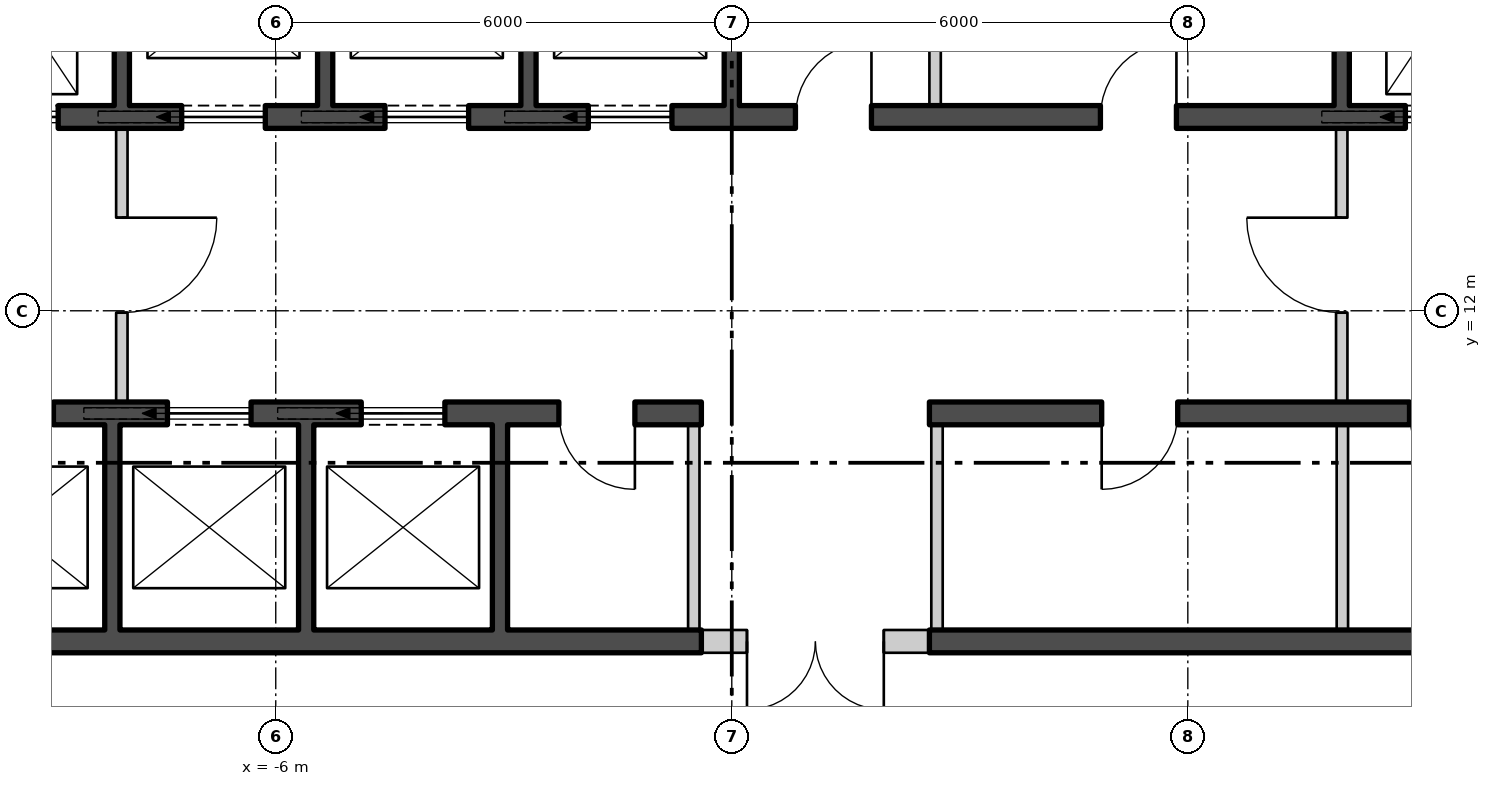
"""IFC4 building model, lengths in metres.
Left out: names, types, materials, properties, quantities, classifications, styles, units other than length and angle.
Written with IfcOpenShell. Run it as: python <this file> out.ifc"""

import sys

from ifc_helpers import new_model, si_unit, direction, frame, frame_2d, origin, place, context, subcontext, project, spatial, polyline, rectangle, outline, extrude, element, fill, save


model = new_model("IFC4")
c1 = context("Model", 3, precision=1e-05, world=origin(), true_north=direction((0.0, 1.0)))
c2 = subcontext(c1, "Body", "Model", "MODEL_VIEW")
j1 = project(units=[si_unit("LENGTHUNIT", "METRE"), si_unit("PLANEANGLEUNIT", "RADIAN")], contexts=[c1])
p1 = place(None, origin())
s1 = spatial("IfcSite", under=j1, at=p1, CompositionType="ELEMENT")
p2 = place(p1, origin())
s2 = spatial("IfcBuilding", under=s1, at=p2, CompositionType="ELEMENT")
p3 = place(p2, frame((0.0, 0.0, 292.2)))
s3 = spatial("IfcBuildingStorey", under=s2, at=p3, CompositionType="ELEMENT", Elevation=292.2)
p4 = place(p3, frame((-25.28, 15.792, -0.18), z_axis=(0.0, 0.0, 1.0), x_axis=(0.500000141277, -0.866025322218, 0.0)))
e1 = element("IfcWall", 1, at=p4, inside=s3, PredefinedType="SOLIDWALL", context=c2, shape_type="SweptSolid", body=[
    extrude(outline(polyline([(-0.13, -0.225), (45.86, -0.225), (45.6, 0.225), (0.13, 0.225), (-0.13, -0.225)])), origin(), (0.0, 0.0, 1.0), 5.9),
])
p5 = place(p4, frame((1.424, 0.0, 1.38)))
e2 = element("IfcOpeningElement", 2, at=p5, cuts=e1, PredefinedType="OPENING", context=c2, shape_type="SweptSolid", body=[
    extrude(rectangle(XDim=2.4, YDim=3.6, at=frame_2d((1.2, 1.8))), frame((0.0, 0.235, 0.0), z_axis=(0.0, -1.0, 0.0), x_axis=(1.0, 0.0, 0.0)), (0.0, 0.0, 1.0), 0.47),
])
p6 = place(p4, frame((5.892, 0.0, 1.38)))
e3 = element("IfcOpeningElement", 3, at=p6, cuts=e1, PredefinedType="OPENING", context=c2, shape_type="SweptSolid", body=[
    extrude(rectangle(XDim=2.4, YDim=3.6, at=frame_2d((1.2, 1.8))), frame((0.0, 0.235, 0.0), z_axis=(0.0, -1.0, 0.0), x_axis=(1.0, 0.0, 0.0)), (0.0, 0.0, 1.0), 0.47),
])
p7 = place(p4, frame((10.399, 0.0, 1.38)))
e4 = element("IfcOpeningElement", 4, at=p7, cuts=e1, PredefinedType="OPENING", context=c2, shape_type="SweptSolid", body=[
    extrude(rectangle(XDim=2.4, YDim=3.6, at=frame_2d((1.2, 1.8))), frame((0.0, 0.235, 0.0), z_axis=(0.0, -1.0, 0.0), x_axis=(1.0, 0.0, 0.0)), (0.0, 0.0, 1.0), 0.47),
])
p8 = place(p4, frame((14.905, 0.0, 1.38)))
e5 = element("IfcOpeningElement", 5, at=p8, cuts=e1, PredefinedType="OPENING", context=c2, shape_type="SweptSolid", body=[
    extrude(rectangle(XDim=2.4, YDim=3.6, at=frame_2d((1.2, 1.8))), frame((0.0, 0.235, 0.0), z_axis=(0.0, -1.0, 0.0), x_axis=(1.0, 0.0, 0.0)), (0.0, 0.0, 1.0), 0.47),
])
p9 = place(p4, frame((19.412, 0.0, 1.38)))
e6 = element("IfcOpeningElement", 6, at=p9, cuts=e1, PredefinedType="OPENING", context=c2, shape_type="SweptSolid", body=[
    extrude(rectangle(XDim=2.4, YDim=3.6, at=frame_2d((1.2, 1.8))), frame((0.0, 0.235, 0.0), z_axis=(0.0, -1.0, 0.0), x_axis=(1.0, 0.0, 0.0)), (0.0, 0.0, 1.0), 0.47),
])
p10 = place(p4, frame((23.918, 0.0, 1.38)))
e7 = element("IfcOpeningElement", 7, at=p10, cuts=e1, PredefinedType="OPENING", context=c2, shape_type="SweptSolid", body=[
    extrude(rectangle(XDim=2.4, YDim=3.6, at=frame_2d((1.2, 1.8))), frame((0.0, 0.235, 0.0), z_axis=(0.0, -1.0, 0.0), x_axis=(1.0, 0.0, 0.0)), (0.0, 0.0, 1.0), 0.47),
])
p11 = place(p4, frame((28.425, 0.0, 1.38)))
e8 = element("IfcOpeningElement", 8, at=p11, cuts=e1, PredefinedType="OPENING", context=c2, shape_type="SweptSolid", body=[
    extrude(rectangle(XDim=2.4, YDim=3.6, at=frame_2d((1.2, 1.8))), frame((0.0, 0.235, 0.0), z_axis=(0.0, -1.0, 0.0), x_axis=(1.0, 0.0, 0.0)), (0.0, 0.0, 1.0), 0.47),
])
p12 = place(p4, frame((32.932, 0.0, 1.38)))
e9 = element("IfcOpeningElement", 9, at=p12, cuts=e1, PredefinedType="OPENING", context=c2, shape_type="SweptSolid", body=[
    extrude(rectangle(XDim=2.4, YDim=3.6, at=frame_2d((1.2, 1.8))), frame((0.0, 0.235, 0.0), z_axis=(0.0, -1.0, 0.0), x_axis=(1.0, 0.0, 0.0)), (0.0, 0.0, 1.0), 0.47),
])
p13 = place(p4, frame((37.438, 0.0, 1.38)))
e10 = element("IfcOpeningElement", 10, at=p13, cuts=e1, PredefinedType="OPENING", context=c2, shape_type="SweptSolid", body=[
    extrude(rectangle(XDim=2.4, YDim=3.6, at=frame_2d((1.2, 1.8))), frame((0.0, 0.235, 0.0), z_axis=(0.0, -1.0, 0.0), x_axis=(1.0, 0.0, 0.0)), (0.0, 0.0, 1.0), 0.47),
])
p14 = place(p4, frame((41.907, 0.0, 1.38)))
e11 = element("IfcOpeningElement", 11, at=p14, cuts=e1, PredefinedType="OPENING", context=c2, shape_type="SweptSolid", body=[
    extrude(rectangle(XDim=2.4, YDim=3.6, at=frame_2d((1.2, 1.8))), frame((0.0, 0.235, 0.0), z_axis=(0.0, -1.0, 0.0), x_axis=(1.0, 0.0, 0.0)), (0.0, 0.0, 1.0), 0.47),
])
p15 = place(p3, frame((-10.7, 14.55, 0.0), z_axis=(0.0, 0.0, 1.0), x_axis=(1.0, 0.0, 0.0)))
e12 = element("IfcWall", 12, at=p15, inside=s3, PredefinedType="SHEAR", context=c2, shape_type="SweptSolid", body=[
    extrude(rectangle(XDim=21.4, YDim=0.3, at=frame_2d((10.7, 0.0))), origin(), (0.0, 0.0, 1.0), 5.7),
])
p16 = place(p15, frame((0.738, 0.0, 0.0)))
e13 = element("IfcOpeningElement", 13, at=p16, cuts=e12, PredefinedType="OPENING", context=c2, shape_type="SweptSolid", body=[
    extrude(rectangle(XDim=1.1, YDim=2.1, at=frame_2d((0.55, 1.05))), frame((0.0, 0.16, 0.0), z_axis=(0.0, -1.0, 0.0), x_axis=(1.0, 0.0, 0.0)), (0.0, 0.0, 1.0), 0.32),
])
p17 = place(p15, frame((3.462, 0.0, 0.0)))
e14 = element("IfcOpeningElement", 14, at=p17, cuts=e12, PredefinedType="OPENING", context=c2, shape_type="SweptSolid", body=[
    extrude(rectangle(XDim=1.1, YDim=2.1, at=frame_2d((0.55, 1.05))), frame((0.0, 0.16, 0.0), z_axis=(0.0, -1.0, 0.0), x_axis=(1.0, 0.0, 0.0)), (0.0, 0.0, 1.0), 0.32),
])
p18 = place(p15, frame((6.138, 0.0, 0.0)))
e15 = element("IfcOpeningElement", 15, at=p18, cuts=e12, PredefinedType="OPENING", context=c2, shape_type="SweptSolid", body=[
    extrude(rectangle(XDim=1.1, YDim=2.1, at=frame_2d((0.55, 1.05))), frame((0.0, 0.16, 0.0), z_axis=(0.0, -1.0, 0.0), x_axis=(1.0, 0.0, 0.0)), (0.0, 0.0, 1.0), 0.32),
])
p19 = place(p15, frame((8.812, 0.0, 0.0)))
e16 = element("IfcOpeningElement", 16, at=p19, cuts=e12, PredefinedType="OPENING", context=c2, shape_type="SweptSolid", body=[
    extrude(rectangle(XDim=1.1, YDim=2.1, at=frame_2d((0.55, 1.05))), frame((0.0, 0.16, 0.0), z_axis=(0.0, -1.0, 0.0), x_axis=(1.0, 0.0, 0.0)), (0.0, 0.0, 1.0), 0.32),
])
p20 = place(p15, frame((19.562, 0.0, 0.0)))
e17 = element("IfcOpeningElement", 17, at=p20, cuts=e12, PredefinedType="OPENING", context=c2, shape_type="SweptSolid", body=[
    extrude(rectangle(XDim=1.1, YDim=2.1, at=frame_2d((0.55, 1.05))), frame((0.0, 0.16, 0.0), z_axis=(0.0, -1.0, 0.0), x_axis=(1.0, 0.0, 0.0)), (0.0, 0.0, 1.0), 0.32),
])
p21 = place(p15, frame((11.537, 0.0, 0.0)))
e18 = element("IfcOpeningElement", 18, at=p21, cuts=e12, PredefinedType="OPENING", context=c2, shape_type="SweptSolid", body=[
    extrude(rectangle(XDim=1.0, YDim=2.1, at=frame_2d((0.5, 1.05))), frame((0.0, 0.16, 0.0), z_axis=(0.0, -1.0, 0.0), x_axis=(1.0, 0.0, 0.0)), (0.0, 0.0, 1.0), 0.32),
])
p22 = place(p15, frame((15.55, 0.0, 0.0)))
e19 = element("IfcOpeningElement", 19, at=p22, cuts=e12, PredefinedType="OPENING", context=c2, shape_type="SweptSolid", body=[
    extrude(rectangle(XDim=1.0, YDim=2.1, at=frame_2d((0.5, 1.05))), frame((0.0, 0.16, 0.0), z_axis=(0.0, -1.0, 0.0), x_axis=(1.0, 0.0, 0.0)), (0.0, 0.0, 1.0), 0.32),
])
p23 = place(p3, frame((-10.7, 10.65, 0.0), z_axis=(0.0, 0.0, 1.0), x_axis=(1.0, 0.0, 0.0)))
e20 = element("IfcWall", 20, at=p23, inside=s3, PredefinedType="SHEAR", context=c2, shape_type="SweptSolid", body=[
    extrude(rectangle(XDim=10.3, YDim=0.3, at=frame_2d((5.15, 0.0))), origin(), (0.0, 0.0, 1.0), 5.7),
])
p24 = place(p23, frame((0.675, 0.0, 0.0)))
e21 = element("IfcOpeningElement", 21, at=p24, cuts=e20, PredefinedType="OPENING", context=c2, shape_type="SweptSolid", body=[
    extrude(rectangle(XDim=1.1, YDim=2.1, at=frame_2d((0.55, 1.05))), frame((0.0, 0.16, 0.0), z_axis=(0.0, -1.0, 0.0), x_axis=(1.0, 0.0, 0.0)), (0.0, 0.0, 1.0), 0.32),
])
p25 = place(p23, frame((3.275, 0.0, 0.0)))
e22 = element("IfcOpeningElement", 22, at=p25, cuts=e20, PredefinedType="OPENING", context=c2, shape_type="SweptSolid", body=[
    extrude(rectangle(XDim=1.1, YDim=2.1, at=frame_2d((0.55, 1.05))), frame((0.0, 0.16, 0.0), z_axis=(0.0, -1.0, 0.0), x_axis=(1.0, 0.0, 0.0)), (0.0, 0.0, 1.0), 0.32),
])
p26 = place(p23, frame((5.825, 0.0, 0.0)))
e23 = element("IfcOpeningElement", 23, at=p26, cuts=e20, PredefinedType="OPENING", context=c2, shape_type="SweptSolid", body=[
    extrude(rectangle(XDim=1.1, YDim=2.1, at=frame_2d((0.55, 1.05))), frame((0.0, 0.16, 0.0), z_axis=(0.0, -1.0, 0.0), x_axis=(1.0, 0.0, 0.0)), (0.0, 0.0, 1.0), 0.32),
])
p27 = place(p23, frame((8.425, 0.0, 0.0)))
e24 = element("IfcOpeningElement", 24, at=p27, cuts=e20, PredefinedType="OPENING", context=c2, shape_type="SweptSolid", body=[
    extrude(rectangle(XDim=1.0, YDim=2.1, at=frame_2d((0.5, 1.05))), frame((0.0, 0.16, 0.0), z_axis=(0.0, -1.0, 0.0), x_axis=(1.0, 0.0, 0.0)), (0.0, 0.0, 1.0), 0.32),
])
p28 = place(p3, frame((-10.7, 7.65, 0.0), z_axis=(0.0, 0.0, 1.0), x_axis=(1.0, 0.0, 0.0)))
e25 = element("IfcWall", 25, at=p28, inside=s3, PredefinedType="SHEAR", context=c2, shape_type="SweptSolid", body=[
    extrude(rectangle(XDim=10.3, YDim=0.3, at=frame_2d((5.15, 0.0))), origin(), (0.0, 0.0, 1.0), 5.7),
])
p29 = place(p3, frame((2.6, 10.65, 0.0), z_axis=(0.0, 0.0, 1.0), x_axis=(1.0, 0.0, 0.0)))
e26 = element("IfcWall", 26, at=p29, inside=s3, PredefinedType="SHEAR", context=c2, shape_type="SweptSolid", body=[
    extrude(rectangle(XDim=8.1, YDim=0.3, at=frame_2d((4.05, 0.0))), origin(), (0.0, 0.0, 1.0), 5.7),
])
p30 = place(p29, frame((2.267, 0.0, 0.0)))
e27 = element("IfcOpeningElement", 27, at=p30, cuts=e26, PredefinedType="OPENING", context=c2, shape_type="SweptSolid", body=[
    extrude(rectangle(XDim=1.0, YDim=2.1, at=frame_2d((0.5, 1.05))), frame((0.0, 0.16, 0.0), z_axis=(0.0, -1.0, 0.0), x_axis=(1.0, 0.0, 0.0)), (0.0, 0.0, 1.0), 0.32),
])
p31 = place(p29, frame((6.317, 0.0, 0.0)))
e28 = element("IfcOpeningElement", 28, at=p31, cuts=e26, PredefinedType="OPENING", context=c2, shape_type="SweptSolid", body=[
    extrude(rectangle(XDim=1.0, YDim=2.1, at=frame_2d((0.5, 1.05))), frame((0.0, 0.16, 0.0), z_axis=(0.0, -1.0, 0.0), x_axis=(1.0, 0.0, 0.0)), (0.0, 0.0, 1.0), 0.32),
])
p32 = place(p3, frame((2.6, 7.65, 0.0), z_axis=(0.0, 0.0, 1.0), x_axis=(1.0, 0.0, 0.0)))
e29 = element("IfcWall", 29, at=p32, inside=s3, PredefinedType="SHEAR", context=c2, shape_type="SweptSolid", body=[
    extrude(rectangle(XDim=8.1, YDim=0.3, at=frame_2d((4.05, 0.0))), origin(), (0.0, 0.0, 1.0), 5.7),
])
for number, where, z_axis, x_axis in (
    (30, (-8.025, 14.7, 0.0), (0.0, 0.0, 1.0), (0.0, 1.0, 0.0)),
    (31, (-5.35, 14.7, 0.0), (0.0, 0.0, 1.0), (0.0, 1.0, 0.0)),
    (32, (-2.675, 14.7, 0.0), (0.0, 0.0, 1.0), (0.0, 1.0, 0.0)),
    (33, (0.0, 14.7, 0.0), (0.0, 0.0, 1.0), (0.0, 1.0, 0.0)),
):
    element("IfcWall", number, at=place(p3, frame(where, z_axis=z_axis, x_axis=x_axis)), inside=s3, PredefinedType="SHEAR", context=c2, shape_type="SweptSolid", body=[
        extrude(rectangle(XDim=2.9, YDim=0.2, at=frame_2d((1.45, 0.0))), origin(), (0.0, 0.0, 1.0), 5.7),
    ])
p33 = place(p3, frame((2.675, 14.7, 0.0), z_axis=(0.0, 0.0, 1.0), x_axis=(0.0, 1.0, 0.0)))
e34 = element("IfcWall", 34, at=p33, inside=s3, PredefinedType="PARTITIONING", context=c2, shape_type="SweptSolid", body=[
    extrude(rectangle(XDim=2.9, YDim=0.15, at=frame_2d((1.45, 0.0))), origin(), (0.0, 0.0, 1.0), 5.7),
])
p34 = place(p3, frame((8.025, 14.7, 0.0), z_axis=(0.0, 0.0, 1.0), x_axis=(0.0, 1.0, 0.0)))
e35 = element("IfcWall", 35, at=p34, inside=s3, PredefinedType="SHEAR", context=c2, shape_type="SweptSolid", body=[
    extrude(rectangle(XDim=2.9, YDim=0.2, at=frame_2d((1.45, 0.0))), origin(), (0.0, 0.0, 1.0), 5.7),
])
for number, where, z_axis, x_axis in (
    (36, (-8.15, 7.8, 0.0), (0.0, 0.0, 1.0), (0.0, 1.0, 0.0)),
    (37, (-5.6, 7.8, 0.0), (0.0, 0.0, 1.0), (0.0, 1.0, 0.0)),
    (38, (-3.05, 7.8, 0.0), (0.0, 0.0, 1.0), (0.0, 1.0, 0.0)),
):
    element("IfcWall", number, at=place(p3, frame(where, z_axis=z_axis, x_axis=x_axis)), inside=s3, PredefinedType="SHEAR", context=c2, shape_type="SweptSolid", body=[
        extrude(rectangle(XDim=2.7, YDim=0.2, at=frame_2d((1.35, 0.0))), origin(), (0.0, 0.0, 1.0), 5.7),
    ])
for number, where, z_axis, x_axis in (
    (39, (-0.5, 7.8, 0.0), (0.0, 0.0, 1.0), (0.0, 1.0, 0.0)),
    (40, (2.7, 7.8, 0.0), (0.0, 0.0, 1.0), (0.0, 1.0, 0.0)),
    (41, (8.033, 7.8, 0.0), (0.0, 0.0, 1.0), (0.0, 1.0, 0.0)),
):
    element("IfcWall", number, at=place(p3, frame(where, z_axis=z_axis, x_axis=x_axis)), inside=s3, PredefinedType="PARTITIONING", context=c2, shape_type="SweptSolid", body=[
        extrude(rectangle(XDim=2.7, YDim=0.15, at=frame_2d((1.35, 0.0))), origin(), (0.0, 0.0, 1.0), 5.7),
    ])
p35 = place(p3, frame((-8.025, 10.8, 0.0), z_axis=(0.0, 0.0, 1.0), x_axis=(0.0, 1.0, 0.0)))
e42 = element("IfcWall", 42, at=p35, inside=s3, PredefinedType="PARTITIONING", context=c2, shape_type="SweptSolid", body=[
    extrude(rectangle(XDim=3.6, YDim=0.15, at=frame_2d((1.8, 0.0))), origin(), (0.0, 0.0, 1.0), 5.7),
])
p36 = place(p35, frame((1.175, 0.0, 0.0)))
e43 = element("IfcOpeningElement", 43, at=p36, cuts=e42, PredefinedType="OPENING", context=c2, shape_type="SweptSolid", body=[
    extrude(rectangle(XDim=1.25, YDim=2.1, at=frame_2d((0.625, 1.05))), frame((0.0, 0.085, 0.0), z_axis=(0.0, -1.0, 0.0), x_axis=(1.0, 0.0, 0.0)), (0.0, 0.0, 1.0), 0.17),
])
p37 = place(p3, frame((8.025, 10.8, 0.0), z_axis=(0.0, 0.0, 1.0), x_axis=(0.0, 1.0, 0.0)))
e44 = element("IfcWall", 44, at=p37, inside=s3, PredefinedType="PARTITIONING", context=c2, shape_type="SweptSolid", body=[
    extrude(rectangle(XDim=3.6, YDim=0.15, at=frame_2d((1.8, 0.0))), origin(), (0.0, 0.0, 1.0), 5.7),
])
p38 = place(p37, frame((1.175, 0.0, 0.0)))
e45 = element("IfcOpeningElement", 45, at=p38, cuts=e44, PredefinedType="OPENING", context=c2, shape_type="SweptSolid", body=[
    extrude(rectangle(XDim=1.25, YDim=2.1, at=frame_2d((0.625, 1.05))), frame((0.0, 0.085, 0.0), z_axis=(0.0, -1.0, 0.0), x_axis=(1.0, 0.0, 0.0)), (0.0, 0.0, 1.0), 0.17),
])
p39 = place(p3, frame((-0.4, 7.65, 0.0), z_axis=(0.0, 0.0, 1.0), x_axis=(1.0, 0.0, 0.0)))
e46 = element("IfcWall", 46, at=p39, inside=s3, PredefinedType="PARTITIONING", context=c2, shape_type="SweptSolid", body=[
    extrude(rectangle(XDim=3.0, YDim=0.3, at=frame_2d((1.5, 0.0))), origin(), (0.0, 0.0, 1.0), 5.7),
])
p40 = place(p39, frame((0.6, 0.0, 0.0)))
e47 = element("IfcOpeningElement", 47, at=p40, cuts=e46, PredefinedType="OPENING", context=c2, shape_type="SweptSolid", body=[
    extrude(rectangle(XDim=1.8, YDim=2.4, at=frame_2d((0.9, 1.2))), frame((0.0, 0.16, 0.0), z_axis=(0.0, -1.0, 0.0), x_axis=(1.0, 0.0, 0.0)), (0.0, 0.0, 1.0), 0.32),
])
p41 = place(p16, origin())
e48 = element("IfcDoor", 48, at=p41, inside=s3, OperationType="SLIDING_TO_LEFT", PredefinedType="DOOR", context=c2, shape_type="SweptSolid", body=[
    extrude(rectangle(XDim=1.1, YDim=2.1, at=frame_2d((0.55, 1.05))), frame((0.0, 0.025, 0.0), z_axis=(0.0, -1.0, 0.0), x_axis=(1.0, 0.0, 0.0)), (0.0, 0.0, 1.0), 0.05),
])
fill(e13, e48)
p42 = place(p17, origin())
e49 = element("IfcDoor", 49, at=p42, inside=s3, OperationType="SLIDING_TO_LEFT", PredefinedType="DOOR", context=c2, shape_type="SweptSolid", body=[
    extrude(rectangle(XDim=1.1, YDim=2.1, at=frame_2d((0.55, 1.05))), frame((0.0, 0.025, 0.0), z_axis=(0.0, -1.0, 0.0), x_axis=(1.0, 0.0, 0.0)), (0.0, 0.0, 1.0), 0.05),
])
fill(e14, e49)
p43 = place(p18, origin())
e50 = element("IfcDoor", 50, at=p43, inside=s3, OperationType="SLIDING_TO_LEFT", PredefinedType="DOOR", context=c2, shape_type="SweptSolid", body=[
    extrude(rectangle(XDim=1.1, YDim=2.1, at=frame_2d((0.55, 1.05))), frame((0.0, 0.025, 0.0), z_axis=(0.0, -1.0, 0.0), x_axis=(1.0, 0.0, 0.0)), (0.0, 0.0, 1.0), 0.05),
])
fill(e15, e50)
p44 = place(p19, origin())
e51 = element("IfcDoor", 51, at=p44, inside=s3, OperationType="SLIDING_TO_LEFT", PredefinedType="DOOR", context=c2, shape_type="SweptSolid", body=[
    extrude(rectangle(XDim=1.1, YDim=2.1, at=frame_2d((0.55, 1.05))), frame((0.0, 0.025, 0.0), z_axis=(0.0, -1.0, 0.0), x_axis=(1.0, 0.0, 0.0)), (0.0, 0.0, 1.0), 0.05),
])
fill(e16, e51)
p45 = place(p20, origin())
e52 = element("IfcDoor", 52, at=p45, inside=s3, OperationType="SLIDING_TO_LEFT", PredefinedType="DOOR", context=c2, shape_type="SweptSolid", body=[
    extrude(rectangle(XDim=1.1, YDim=2.1, at=frame_2d((0.55, 1.05))), frame((0.0, 0.025, 0.0), z_axis=(0.0, -1.0, 0.0), x_axis=(1.0, 0.0, 0.0)), (0.0, 0.0, 1.0), 0.05),
])
fill(e17, e52)
p46 = place(p24, origin())
e53 = element("IfcDoor", 53, at=p46, inside=s3, OperationType="SLIDING_TO_LEFT", PredefinedType="DOOR", context=c2, shape_type="SweptSolid", body=[
    extrude(rectangle(XDim=1.1, YDim=2.1, at=frame_2d((0.55, 1.05))), frame((0.0, 0.025, 0.0), z_axis=(0.0, -1.0, 0.0), x_axis=(1.0, 0.0, 0.0)), (0.0, 0.0, 1.0), 0.05),
])
fill(e21, e53)
p47 = place(p25, origin())
e54 = element("IfcDoor", 54, at=p47, inside=s3, OperationType="SLIDING_TO_LEFT", PredefinedType="DOOR", context=c2, shape_type="SweptSolid", body=[
    extrude(rectangle(XDim=1.1, YDim=2.1, at=frame_2d((0.55, 1.05))), frame((0.0, 0.025, 0.0), z_axis=(0.0, -1.0, 0.0), x_axis=(1.0, 0.0, 0.0)), (0.0, 0.0, 1.0), 0.05),
])
fill(e22, e54)
p48 = place(p26, origin())
e55 = element("IfcDoor", 55, at=p48, inside=s3, OperationType="SLIDING_TO_LEFT", PredefinedType="DOOR", context=c2, shape_type="SweptSolid", body=[
    extrude(rectangle(XDim=1.1, YDim=2.1, at=frame_2d((0.55, 1.05))), frame((0.0, 0.025, 0.0), z_axis=(0.0, -1.0, 0.0), x_axis=(1.0, 0.0, 0.0)), (0.0, 0.0, 1.0), 0.05),
])
fill(e23, e55)
p49 = place(p21, origin())
e56 = element("IfcDoor", 56, at=p49, inside=s3, OperationType="SINGLE_SWING_LEFT", PredefinedType="DOOR", context=c2, shape_type="SweptSolid", body=[
    extrude(rectangle(XDim=1.0, YDim=2.1, at=frame_2d((0.5, 1.05))), frame((0.0, 0.025, 0.0), z_axis=(0.0, -1.0, 0.0), x_axis=(1.0, 0.0, 0.0)), (0.0, 0.0, 1.0), 0.05),
])
fill(e18, e56)
p50 = place(p22, origin())
e57 = element("IfcDoor", 57, at=p50, inside=s3, OperationType="SINGLE_SWING_LEFT", PredefinedType="DOOR", context=c2, shape_type="SweptSolid", body=[
    extrude(rectangle(XDim=1.0, YDim=2.1, at=frame_2d((0.5, 1.05))), frame((0.0, 0.025, 0.0), z_axis=(0.0, -1.0, 0.0), x_axis=(1.0, 0.0, 0.0)), (0.0, 0.0, 1.0), 0.05),
])
fill(e19, e57)
p51 = place(p27, origin())
e58 = element("IfcDoor", 58, at=p51, inside=s3, OperationType="SINGLE_SWING_RIGHT", PredefinedType="DOOR", context=c2, shape_type="SweptSolid", body=[
    extrude(rectangle(XDim=1.0, YDim=2.1, at=frame_2d((0.5, 1.05))), frame((0.0, 0.025, 0.0), z_axis=(0.0, -1.0, 0.0), x_axis=(1.0, 0.0, 0.0)), (0.0, 0.0, 1.0), 0.05),
])
fill(e24, e58)
p52 = place(p30, origin())
e59 = element("IfcDoor", 59, at=p52, inside=s3, OperationType="SINGLE_SWING_LEFT", PredefinedType="DOOR", context=c2, shape_type="SweptSolid", body=[
    extrude(rectangle(XDim=1.0, YDim=2.1, at=frame_2d((0.5, 1.05))), frame((0.0, 0.025, 0.0), z_axis=(0.0, -1.0, 0.0), x_axis=(1.0, 0.0, 0.0)), (0.0, 0.0, 1.0), 0.05),
])
fill(e27, e59)
p53 = place(p31, origin())
e60 = element("IfcDoor", 60, at=p53, inside=s3, OperationType="SINGLE_SWING_RIGHT", PredefinedType="DOOR", context=c2, shape_type="SweptSolid", body=[
    extrude(rectangle(XDim=1.0, YDim=2.1, at=frame_2d((0.5, 1.05))), frame((0.0, 0.025, 0.0), z_axis=(0.0, -1.0, 0.0), x_axis=(1.0, 0.0, 0.0)), (0.0, 0.0, 1.0), 0.05),
])
fill(e28, e60)
p54 = place(p36, origin())
e61 = element("IfcDoor", 61, at=p54, inside=s3, OperationType="SINGLE_SWING_RIGHT", PredefinedType="DOOR", context=c2, shape_type="SweptSolid", body=[
    extrude(rectangle(XDim=1.25, YDim=2.1, at=frame_2d((0.625, 1.05))), frame((0.0, 0.025, 0.0), z_axis=(0.0, -1.0, 0.0), x_axis=(1.0, 0.0, 0.0)), (0.0, 0.0, 1.0), 0.05),
])
fill(e43, e61)
p55 = place(p38, origin())
e62 = element("IfcDoor", 62, at=p55, inside=s3, OperationType="SINGLE_SWING_LEFT", PredefinedType="DOOR", context=c2, shape_type="SweptSolid", body=[
    extrude(rectangle(XDim=1.25, YDim=2.1, at=frame_2d((0.625, 1.05))), frame((0.0, 0.025, 0.0), z_axis=(0.0, -1.0, 0.0), x_axis=(1.0, 0.0, 0.0)), (0.0, 0.0, 1.0), 0.05),
])
fill(e45, e62)
p56 = place(p40, origin())
e63 = element("IfcDoor", 63, at=p56, inside=s3, OperationType="DOUBLE_DOOR_SINGLE_SWING", PredefinedType="DOOR", context=c2, shape_type="SweptSolid", body=[
    extrude(rectangle(XDim=1.8, YDim=2.4, at=frame_2d((0.9, 1.2))), frame((0.0, 0.025, 0.0), z_axis=(0.0, -1.0, 0.0), x_axis=(1.0, 0.0, 0.0)), (0.0, 0.0, 1.0), 0.05),
])
fill(e47, e63)
save(model, sys.argv[1])
